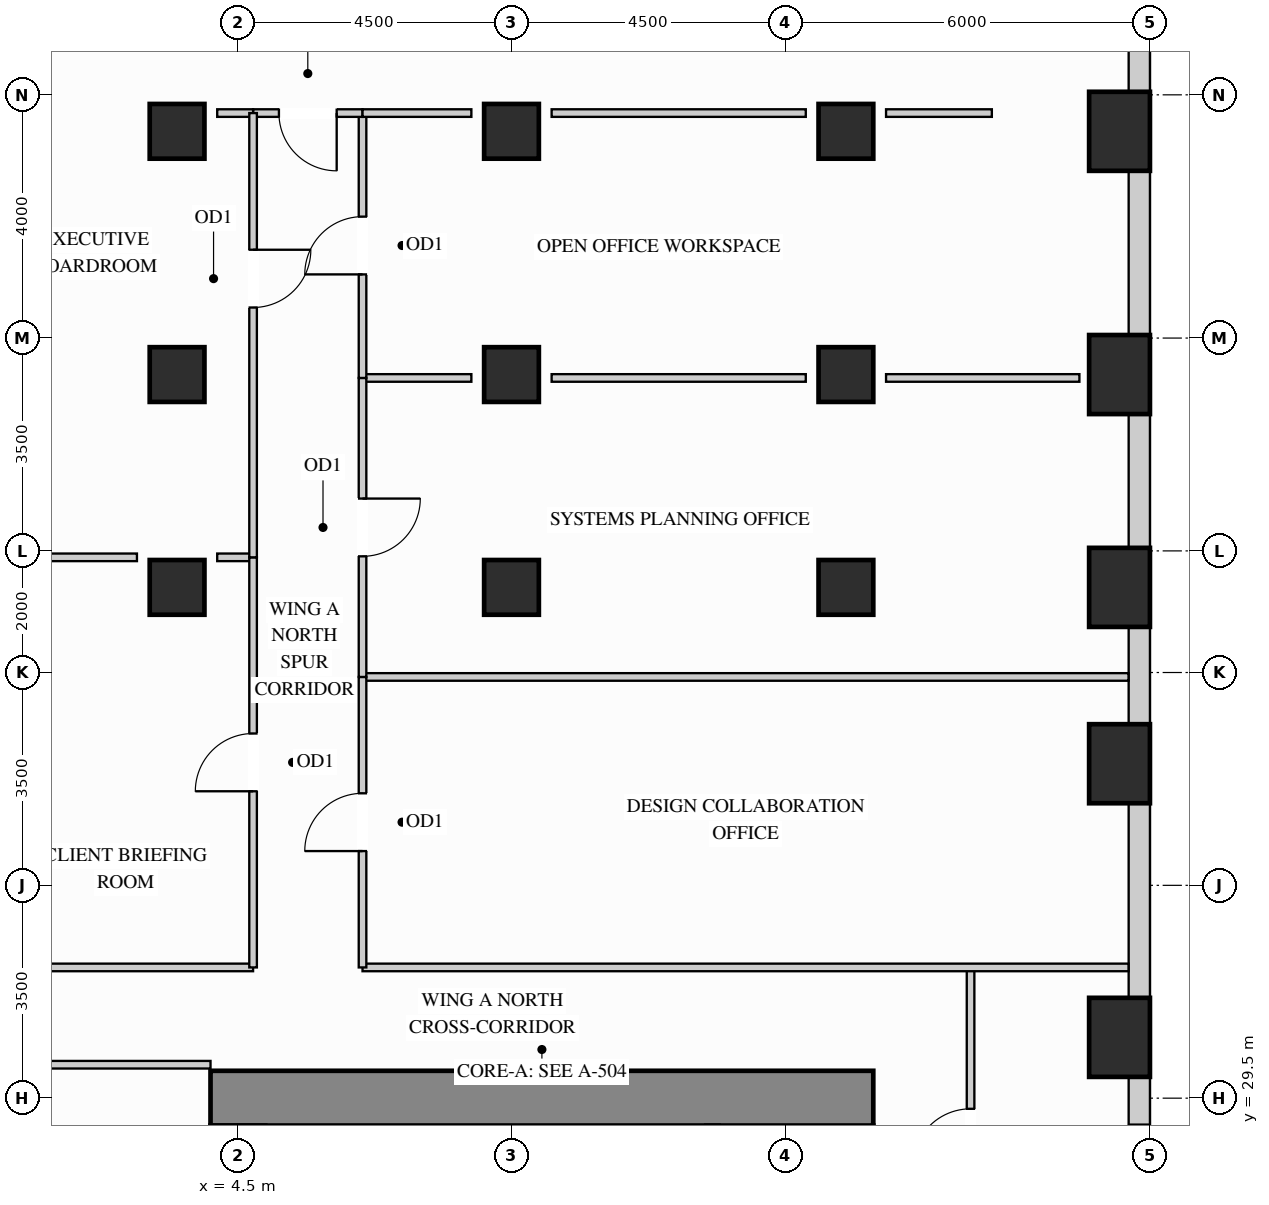
"""IFC4 building model, lengths in metres.
Left out: names, types, materials, properties, quantities, classifications, styles, units other than length and angle.
Written with IfcOpenShell. Run it as: python <this file> out.ifc"""

import sys

from ifc_helpers import new_model, si_unit, direction, frame, frame_2d, origin, origin_2d, place, context, subcontext, project, spatial, rectangle, extrude, source, transform, mapped, element, fill, save


model = new_model("IFC4")
c1 = context("Model", 3, precision=1e-05, world=origin(), true_north=direction((0.0, 1.0)))
c2 = subcontext(c1, "Body", "Model", "MODEL_VIEW")
j1 = project(units=[si_unit("LENGTHUNIT", "METRE"), si_unit("PLANEANGLEUNIT", "RADIAN")], contexts=[c1])
p1 = place(None, origin())
s1 = spatial("IfcSite", under=j1, at=p1, CompositionType="ELEMENT")
p2 = place(p1, origin())
s2 = spatial("IfcBuilding", under=s1, at=p2, CompositionType="ELEMENT")
p3 = place(p2, frame((0.0, 0.0, 44.1)))
s3 = spatial("IfcBuildingStorey", under=s2, at=p3, CompositionType="ELEMENT", Elevation=44.1)
m1 = source(origin(), c2, "Body", "SweptSolid", [
    extrude(rectangle(XDim=0.9, YDim=0.9, at=origin_2d()), origin(), (0.0, 0.0, 1.0), 3.38),
])
for number, where, z_axis, x_axis in (
    (1, (14.5, 37.9, 0.0), (0.0, 0.0, 1.0), (1.0, 0.0, 0.0)),
    (2, (14.5, 41.4, 0.0), (0.0, 0.0, 1.0), (1.0, 0.0, 0.0)),
    (3, (14.5, 45.4, 0.0), (0.0, 0.0, 1.0), (1.0, 0.0, 0.0)),
    (4, (3.5, 37.9, 0.0), (0.0, 0.0, 1.0), (1.0, 0.0, 0.0)),
    (5, (3.5, 41.4, 0.0), (0.0, 0.0, 1.0), (1.0, 0.0, 0.0)),
    (6, (3.5, 45.4, 0.0), (0.0, 0.0, 1.0), (1.0, 0.0, 0.0)),
    (7, (9.0, 37.9, 0.0), (0.0, 0.0, 1.0), (1.0, 0.0, 0.0)),
    (8, (9.0, 41.4, 0.0), (0.0, 0.0, 1.0), (1.0, 0.0, 0.0)),
    (9, (9.0, 45.4, 0.0), (0.0, 0.0, 1.0), (1.0, 0.0, 0.0)),
):
    element("IfcColumn", number, at=place(p3, frame(where, z_axis=z_axis, x_axis=x_axis)), inside=s3, PredefinedType="COLUMN", context=c2, shape_type="MappedRepresentation", body=[
        mapped(m1, transform((0.0, 0.0, 0.0), x_axis=(1.0, 0.0, 0.0), y_axis=(0.0, 1.0, 0.0), z_axis=(0.0, 0.0, 1.0))),
    ])
m2 = source(origin(), c2, "Body", "SweptSolid", [
    extrude(rectangle(XDim=1.0, YDim=1.3, at=origin_2d()), origin(), (0.0, 0.0, 1.0), 3.38),
])
for number, where, z_axis, x_axis in (
    (10, (19.0, 30.5, 0.0), (0.0, 0.0, 1.0), (1.0, 0.0, 0.0)),
    (11, (19.0, 35.0, 0.0), (0.0, 0.0, 1.0), (1.0, 0.0, 0.0)),
    (12, (19.0, 37.9, 0.0), (0.0, 0.0, 1.0), (1.0, 0.0, 0.0)),
    (13, (19.0, 41.4, 0.0), (0.0, 0.0, 1.0), (1.0, 0.0, 0.0)),
    (14, (19.0, 45.4, 0.0), (0.0, 0.0, 1.0), (1.0, 0.0, 0.0)),
):
    element("IfcColumn", number, at=place(p3, frame(where, z_axis=z_axis, x_axis=x_axis)), inside=s3, PredefinedType="COLUMN", context=c2, shape_type="MappedRepresentation", body=[
        mapped(m2, transform((0.0, 0.0, 0.0), x_axis=(1.0, 0.0, 0.0), y_axis=(0.0, 1.0, 0.0), z_axis=(0.0, 0.0, 1.0))),
    ])
m3 = source(origin(), c2, "Body", "SweptSolid", [
    extrude(rectangle(XDim=10.9, YDim=0.9, at=frame_2d((5.45, 0.0))), origin(), (0.0, 0.0, 1.0), 3.38),
])
p4 = place(p3, frame((4.05, 29.5, 0.0), z_axis=(0.0, 0.0, 1.0), x_axis=(1.0, 0.0, 0.0)))
e15 = element("IfcWall", 15, at=p4, inside=s3, PredefinedType="SHEAR", context=c2, shape_type="MappedRepresentation", body=[
    mapped(m3, transform((0.0, 0.0, 0.0), x_axis=(1.0, 0.0, 0.0), y_axis=(0.0, 1.0, 0.0), z_axis=(0.0, 0.0, 1.0))),
])
p5 = place(p3, frame((19.325, 27.448, 0.0), z_axis=(0.0, 0.0, 1.0), x_axis=(0.0, 1.0, 0.0)))
e16 = element("IfcWall", 16, at=p5, inside=s3, PredefinedType="SOLIDWALL", context=c2, shape_type="SweptSolid", body=[
    extrude(rectangle(XDim=2.404, YDim=0.35, at=frame_2d((1.202, 0.0))), origin(), (0.0, 0.0, 1.0), 2.51),
])
p6 = place(p5, frame((0.417, 0.0, 0.78)))
e17 = element("IfcOpeningElement", 17, at=p6, cuts=e16, PredefinedType="OPENING", context=c2, shape_type="SweptSolid", body=[
    extrude(rectangle(XDim=1.2, YDim=1.55, at=frame_2d((0.6, 0.775))), frame((0.0, 0.185, 0.0), z_axis=(0.0, -1.0, 0.0), x_axis=(1.0, 0.0, 0.0)), (0.0, 0.0, 1.0), 0.37),
])
m4 = source(origin(), c2, "Body", "SweptSolid", [
    extrude(rectangle(XDim=3.204, YDim=0.35, at=frame_2d((1.602, 0.0))), origin(), (0.0, 0.0, 1.0), 2.51),
])
p7 = place(p3, frame((19.325, 31.148, 0.0), z_axis=(0.0, 0.0, 1.0), x_axis=(0.0, 1.0, 0.0)))
e18 = element("IfcWall", 18, at=p7, inside=s3, PredefinedType="SOLIDWALL", context=c2, shape_type="MappedRepresentation", body=[
    mapped(m4, transform((0.0, 0.0, 0.0), x_axis=(1.0, 0.0, 0.0), y_axis=(0.0, 1.0, 0.0), z_axis=(0.0, 0.0, 1.0))),
])
m5 = source(origin(), c2, "Body", "SweptSolid", [
    extrude(rectangle(XDim=1.604, YDim=0.35, at=frame_2d((0.802, 0.0))), origin(), (0.0, 0.0, 1.0), 2.51),
])
p8 = place(p3, frame((19.325, 35.648, 0.0), z_axis=(0.0, 0.0, 1.0), x_axis=(0.0, 1.0, 0.0)))
e19 = element("IfcWall", 19, at=p8, inside=s3, PredefinedType="SOLIDWALL", context=c2, shape_type="MappedRepresentation", body=[
    mapped(m5, transform((0.0, 0.0, 0.0), x_axis=(1.0, 0.0, 0.0), y_axis=(0.0, 1.0, 0.0), z_axis=(0.0, 0.0, 1.0))),
])
m6 = source(origin(), c2, "Body", "SweptSolid", [
    extrude(rectangle(XDim=2.204, YDim=0.35, at=frame_2d((1.102, 0.0))), origin(), (0.0, 0.0, 1.0), 2.51),
])
p9 = place(p3, frame((19.325, 38.548, 0.0), z_axis=(0.0, 0.0, 1.0), x_axis=(0.0, 1.0, 0.0)))
e20 = element("IfcWall", 20, at=p9, inside=s3, PredefinedType="SOLIDWALL", context=c2, shape_type="MappedRepresentation", body=[
    mapped(m6, transform((0.0, 0.0, 0.0), x_axis=(1.0, 0.0, 0.0), y_axis=(0.0, 1.0, 0.0), z_axis=(0.0, 0.0, 1.0))),
])
m7 = source(origin(), c2, "Body", "SweptSolid", [
    extrude(rectangle(XDim=2.704, YDim=0.35, at=frame_2d((1.352, 0.0))), origin(), (0.0, 0.0, 1.0), 2.51),
])
p10 = place(p3, frame((19.325, 42.048, 0.0), z_axis=(0.0, 0.0, 1.0), x_axis=(0.0, 1.0, 0.0)))
e21 = element("IfcWall", 21, at=p10, inside=s3, PredefinedType="SOLIDWALL", context=c2, shape_type="MappedRepresentation", body=[
    mapped(m7, transform((0.0, 0.0, 0.0), x_axis=(1.0, 0.0, 0.0), y_axis=(0.0, 1.0, 0.0), z_axis=(0.0, 0.0, 1.0))),
])
m8 = source(origin(), c2, "Body", "SweptSolid", [
    extrude(rectangle(XDim=1.104, YDim=0.35, at=frame_2d((0.552, 0.0))), origin(), (0.0, 0.0, 1.0), 3.365),
])
p11 = place(p3, frame((19.325, 46.048, 0.0), z_axis=(0.0, 0.0, 1.0), x_axis=(0.0, 1.0, 0.0)))
e22 = element("IfcWall", 22, at=p11, inside=s3, PredefinedType="SOLIDWALL", context=c2, shape_type="MappedRepresentation", body=[
    mapped(m8, transform((0.0, 0.0, 0.0), x_axis=(1.0, 0.0, 0.0), y_axis=(0.0, 1.0, 0.0), z_axis=(0.0, 0.0, 1.0))),
])
p12 = place(p3, frame((16.55, 26.05, 0.0), z_axis=(0.0, 0.0, 1.0), x_axis=(0.0, 1.0, 0.0)))
e23 = element("IfcWall", 23, at=p12, inside=s3, PredefinedType="PARTITIONING", context=c2, shape_type="SweptSolid", body=[
    extrude(rectangle(XDim=5.6, YDim=0.125, at=frame_2d((2.8, 0.0))), origin(), (0.0, 0.0, 1.0), 3.365),
])
p13 = place(p12, frame((2.325, 0.0, 0.0)))
e24 = element("IfcOpeningElement", 24, at=p13, cuts=e23, PredefinedType="OPENING", context=c2, shape_type="SweptSolid", body=[
    extrude(rectangle(XDim=0.95, YDim=2.15, at=frame_2d((0.475, 1.075))), frame((0.0, 0.073, 0.0), z_axis=(0.0, -1.0, 0.0), x_axis=(1.0, 0.0, 0.0)), (0.0, 0.0, 1.0), 0.145),
])
m9 = source(origin(), c2, "Body", "SweptSolid", [
    extrude(rectangle(XDim=12.598, YDim=0.125, at=frame_2d((6.299, 0.0))), origin(), (0.0, 0.0, 1.0), 2.828),
])
p14 = place(p3, frame((6.55, 36.427, 0.0), z_axis=(0.0, 0.0, 1.0), x_axis=(1.0, 0.0, 0.0)))
e25 = element("IfcWall", 25, at=p14, inside=s3, PredefinedType="PARTITIONING", context=c2, shape_type="MappedRepresentation", body=[
    mapped(m9, transform((0.0, 0.0, 0.0), x_axis=(1.0, 0.0, 0.0), y_axis=(0.0, 1.0, 0.0), z_axis=(0.0, 0.0, 1.0))),
])
m10 = source(origin(), c2, "Body", "SweptSolid", [
    extrude(rectangle(XDim=1.79, YDim=0.125, at=frame_2d((0.895, 0.0))), origin(), (0.0, 0.0, 1.0), 2.67),
])
p15 = place(p3, frame((6.55, 41.344, 0.0), z_axis=(0.0, 0.0, 1.0), x_axis=(1.0, 0.0, 0.0)))
e26 = element("IfcWall", 26, at=p15, inside=s3, PredefinedType="PARTITIONING", context=c2, shape_type="MappedRepresentation", body=[
    mapped(m10, transform((0.0, 0.0, 0.0), x_axis=(1.0, 0.0, 0.0), y_axis=(0.0, 1.0, 0.0), z_axis=(0.0, 0.0, 1.0))),
])
m11 = source(origin(), c2, "Body", "SweptSolid", [
    extrude(rectangle(XDim=4.18, YDim=0.125, at=frame_2d((2.09, 0.0))), origin(), (0.0, 0.0, 1.0), 2.67),
])
p16 = place(p3, frame((9.66, 41.344, 0.0), z_axis=(0.0, 0.0, 1.0), x_axis=(1.0, 0.0, 0.0)))
e27 = element("IfcWall", 27, at=p16, inside=s3, PredefinedType="PARTITIONING", context=c2, shape_type="MappedRepresentation", body=[
    mapped(m11, transform((0.0, 0.0, 0.0), x_axis=(1.0, 0.0, 0.0), y_axis=(0.0, 1.0, 0.0), z_axis=(0.0, 0.0, 1.0))),
])
m12 = source(origin(), c2, "Body", "SweptSolid", [
    extrude(rectangle(XDim=3.18, YDim=0.125, at=frame_2d((1.59, 0.0))), origin(), (0.0, 0.0, 1.0), 2.67),
])
p17 = place(p3, frame((15.16, 41.344, 0.0), z_axis=(0.0, 0.0, 1.0), x_axis=(1.0, 0.0, 0.0)))
e28 = element("IfcWall", 28, at=p17, inside=s3, PredefinedType="PARTITIONING", context=c2, shape_type="MappedRepresentation", body=[
    mapped(m12, transform((0.0, 0.0, 0.0), x_axis=(1.0, 0.0, 0.0), y_axis=(0.0, 1.0, 0.0), z_axis=(0.0, 0.0, 1.0))),
])
p18 = place(p3, frame((6.55, 31.65, 0.0), z_axis=(0.0, 0.0, 1.0), x_axis=(1.0, 0.0, 0.0)))
e29 = element("IfcWall", 29, at=p18, inside=s3, PredefinedType="PARTITIONING", context=c2, shape_type="MappedRepresentation", body=[
    mapped(m9, transform((0.0, 0.0, 0.0), x_axis=(1.0, 0.0, 0.0), y_axis=(0.0, 1.0, 0.0), z_axis=(0.0, 0.0, 1.0))),
])
m13 = source(origin(), c2, "Body", "SweptSolid", [
    extrude(rectangle(XDim=4.398, YDim=0.125, at=frame_2d((2.199, 0.0))), origin(), (0.0, 0.0, 1.0), 2.828),
])
p19 = place(p3, frame((0.352, 31.65, 0.0), z_axis=(0.0, 0.0, 1.0), x_axis=(1.0, 0.0, 0.0)))
e30 = element("IfcWall", 30, at=p19, inside=s3, PredefinedType="PARTITIONING", context=c2, shape_type="MappedRepresentation", body=[
    mapped(m13, transform((0.0, 0.0, 0.0), x_axis=(1.0, 0.0, 0.0), y_axis=(0.0, 1.0, 0.0), z_axis=(0.0, 0.0, 1.0))),
])
m14 = source(origin(), c2, "Body", "SweptSolid", [
    extrude(rectangle(XDim=1.58, YDim=0.125, at=frame_2d((0.79, 0.0))), origin(), (0.0, 0.0, 1.0), 3.365),
])
p20 = place(p3, frame((1.26, 38.394, 0.0), z_axis=(0.0, 0.0, 1.0), x_axis=(1.0, 0.0, 0.0)))
e31 = element("IfcWall", 31, at=p20, inside=s3, PredefinedType="PARTITIONING", context=c2, shape_type="MappedRepresentation", body=[
    mapped(m14, transform((0.0, 0.0, 0.0), x_axis=(1.0, 0.0, 0.0), y_axis=(0.0, 1.0, 0.0), z_axis=(0.0, 0.0, 1.0))),
])
m15 = source(origin(), c2, "Body", "SweptSolid", [
    extrude(rectangle(XDim=0.59, YDim=0.125, at=frame_2d((0.295, 0.0))), origin(), (0.0, 0.0, 1.0), 3.365),
])
p21 = place(p3, frame((4.16, 38.394, 0.0), z_axis=(0.0, 0.0, 1.0), x_axis=(1.0, 0.0, 0.0)))
e32 = element("IfcWall", 32, at=p21, inside=s3, PredefinedType="PARTITIONING", context=c2, shape_type="MappedRepresentation", body=[
    mapped(m15, transform((0.0, 0.0, 0.0), x_axis=(1.0, 0.0, 0.0), y_axis=(0.0, 1.0, 0.0), z_axis=(0.0, 0.0, 1.0))),
])
m16 = source(origin(), c2, "Body", "SweptSolid", [
    extrude(rectangle(XDim=2.79, YDim=0.125, at=frame_2d((1.395, 0.0))), origin(), (0.0, 0.0, 1.0), 3.365),
])
p22 = place(p3, frame((1.26, 30.05, 0.0), z_axis=(0.0, 0.0, 1.0), x_axis=(1.0, 0.0, 0.0)))
e33 = element("IfcWall", 33, at=p22, inside=s3, PredefinedType="PARTITIONING", context=c2, shape_type="MappedRepresentation", body=[
    mapped(m16, transform((0.0, 0.0, 0.0), x_axis=(1.0, 0.0, 0.0), y_axis=(0.0, 1.0, 0.0), z_axis=(0.0, 0.0, 1.0))),
])
p23 = place(p3, frame((6.55, 31.65, 0.0), z_axis=(0.0, 0.0, 1.0), x_axis=(0.0, 1.0, 0.0)))
e34 = element("IfcWall", 34, at=p23, inside=s3, PredefinedType="PARTITIONING", context=c2, shape_type="SweptSolid", body=[
    extrude(rectangle(XDim=4.777, YDim=0.125, at=frame_2d((2.389, 0.0))), origin(), (0.0, 0.0, 1.0), 3.365),
])
p24 = place(p23, frame((1.914, 0.0, 0.0)))
e35 = element("IfcOpeningElement", 35, at=p24, cuts=e34, PredefinedType="OPENING", context=c2, shape_type="SweptSolid", body=[
    extrude(rectangle(XDim=0.95, YDim=2.15, at=frame_2d((0.475, 1.075))), frame((0.0, 0.073, 0.0), z_axis=(0.0, -1.0, 0.0), x_axis=(1.0, 0.0, 0.0)), (0.0, 0.0, 1.0), 0.145),
])
p25 = place(p3, frame((6.55, 36.427, 0.0), z_axis=(0.0, 0.0, 1.0), x_axis=(0.0, 1.0, 0.0)))
e36 = element("IfcWall", 36, at=p25, inside=s3, PredefinedType="PARTITIONING", context=c2, shape_type="SweptSolid", body=[
    extrude(rectangle(XDim=4.917, YDim=0.125, at=frame_2d((2.458, 0.0))), origin(), (0.0, 0.0, 1.0), 3.365),
])
p26 = place(p25, frame((1.983, 0.0, 0.0)))
e37 = element("IfcOpeningElement", 37, at=p26, cuts=e36, PredefinedType="OPENING", context=c2, shape_type="SweptSolid", body=[
    extrude(rectangle(XDim=0.95, YDim=2.15, at=frame_2d((0.475, 1.075))), frame((0.0, 0.073, 0.0), z_axis=(0.0, -1.0, 0.0), x_axis=(1.0, 0.0, 0.0)), (0.0, 0.0, 1.0), 0.145),
])
p27 = place(p3, frame((6.55, 41.344, 0.0), z_axis=(0.0, 0.0, 1.0), x_axis=(0.0, 1.0, 0.0)))
e38 = element("IfcWall", 38, at=p27, inside=s3, PredefinedType="PARTITIONING", context=c2, shape_type="SweptSolid", body=[
    extrude(rectangle(XDim=4.356, YDim=0.125, at=frame_2d((2.178, 0.0))), origin(), (0.0, 0.0, 1.0), 3.365),
])
p28 = place(p27, frame((1.703, 0.0, 0.0)))
e39 = element("IfcOpeningElement", 39, at=p28, cuts=e38, PredefinedType="OPENING", context=c2, shape_type="SweptSolid", body=[
    extrude(rectangle(XDim=0.95, YDim=2.15, at=frame_2d((0.475, 1.075))), frame((0.0, 0.073, 0.0), z_axis=(0.0, -1.0, 0.0), x_axis=(1.0, 0.0, 0.0)), (0.0, 0.0, 1.0), 0.145),
])
p29 = place(p3, frame((4.75, 45.7, 0.0), z_axis=(0.0, 0.0, 1.0), x_axis=(1.0, 0.0, 0.0)))
e40 = element("IfcWall", 40, at=p29, inside=s3, PredefinedType="PARTITIONING", context=c2, shape_type="SweptSolid", body=[
    extrude(rectangle(XDim=1.8, YDim=0.125, at=frame_2d((0.9, 0.0))), origin(), (0.0, 0.0, 1.0), 2.67),
])
p30 = place(p29, frame((0.425, 0.0, 0.0)))
e41 = element("IfcOpeningElement", 41, at=p30, cuts=e40, PredefinedType="OPENING", context=c2, shape_type="SweptSolid", body=[
    extrude(rectangle(XDim=0.95, YDim=2.15, at=frame_2d((0.475, 1.075))), frame((0.0, 0.073, 0.0), z_axis=(0.0, -1.0, 0.0), x_axis=(1.0, 0.0, 0.0)), (0.0, 0.0, 1.0), 0.145),
])
p31 = place(p3, frame((6.55, 45.7, 0.0), z_axis=(0.0, 0.0, 1.0), x_axis=(1.0, 0.0, 0.0)))
e42 = element("IfcWall", 42, at=p31, inside=s3, PredefinedType="PARTITIONING", context=c2, shape_type="MappedRepresentation", body=[
    mapped(m10, transform((0.0, 0.0, 0.0), x_axis=(1.0, 0.0, 0.0), y_axis=(0.0, 1.0, 0.0), z_axis=(0.0, 0.0, 1.0))),
])
p32 = place(p3, frame((9.66, 45.7, 0.0), z_axis=(0.0, 0.0, 1.0), x_axis=(1.0, 0.0, 0.0)))
e43 = element("IfcWall", 43, at=p32, inside=s3, PredefinedType="PARTITIONING", context=c2, shape_type="MappedRepresentation", body=[
    mapped(m11, transform((0.0, 0.0, 0.0), x_axis=(1.0, 0.0, 0.0), y_axis=(0.0, 1.0, 0.0), z_axis=(0.0, 0.0, 1.0))),
])
m17 = source(origin(), c2, "Body", "SweptSolid", [
    extrude(rectangle(XDim=1.74, YDim=0.125, at=frame_2d((0.87, 0.0))), origin(), (0.0, 0.0, 1.0), 2.67),
])
p33 = place(p3, frame((15.16, 45.7, 0.0), z_axis=(0.0, 0.0, 1.0), x_axis=(1.0, 0.0, 0.0)))
e44 = element("IfcWall", 44, at=p33, inside=s3, PredefinedType="PARTITIONING", context=c2, shape_type="MappedRepresentation", body=[
    mapped(m17, transform((0.0, 0.0, 0.0), x_axis=(1.0, 0.0, 0.0), y_axis=(0.0, 1.0, 0.0), z_axis=(0.0, 0.0, 1.0))),
])
m18 = source(origin(), c2, "Body", "SweptSolid", [
    extrude(rectangle(XDim=0.59, YDim=0.125, at=frame_2d((0.295, 0.0))), origin(), (0.0, 0.0, 1.0), 2.67),
])
p34 = place(p3, frame((4.16, 45.7, 0.0), z_axis=(0.0, 0.0, 1.0), x_axis=(1.0, 0.0, 0.0)))
e45 = element("IfcWall", 45, at=p34, inside=s3, PredefinedType="PARTITIONING", context=c2, shape_type="MappedRepresentation", body=[
    mapped(m18, transform((0.0, 0.0, 0.0), x_axis=(1.0, 0.0, 0.0), y_axis=(0.0, 1.0, 0.0), z_axis=(0.0, 0.0, 1.0))),
])
p35 = place(p3, frame((4.75, 31.65, 0.0), z_axis=(0.0, 0.0, 1.0), x_axis=(0.0, 1.0, 0.0)))
e46 = element("IfcWall", 46, at=p35, inside=s3, PredefinedType="PARTITIONING", context=c2, shape_type="SweptSolid", body=[
    extrude(rectangle(XDim=6.744, YDim=0.125, at=frame_2d((3.372, 0.0))), origin(), (0.0, 0.0, 1.0), 3.365),
])
p36 = place(p35, frame((2.897, 0.0, 0.0)))
e47 = element("IfcOpeningElement", 47, at=p36, cuts=e46, PredefinedType="OPENING", context=c2, shape_type="SweptSolid", body=[
    extrude(rectangle(XDim=0.95, YDim=2.15, at=frame_2d((0.475, 1.075))), frame((0.0, 0.073, 0.0), z_axis=(0.0, -1.0, 0.0), x_axis=(1.0, 0.0, 0.0)), (0.0, 0.0, 1.0), 0.145),
])
p37 = place(p3, frame((4.75, 38.394, 0.0), z_axis=(0.0, 0.0, 1.0), x_axis=(0.0, 1.0, 0.0)))
e48 = element("IfcWall", 48, at=p37, inside=s3, PredefinedType="PARTITIONING", context=c2, shape_type="SweptSolid", body=[
    extrude(rectangle(XDim=7.306, YDim=0.125, at=frame_2d((3.653, 0.0))), origin(), (0.0, 0.0, 1.0), 3.365),
])
p38 = place(p37, frame((4.108, 0.0, 0.0)))
e49 = element("IfcOpeningElement", 49, at=p38, cuts=e48, PredefinedType="OPENING", context=c2, shape_type="SweptSolid", body=[
    extrude(rectangle(XDim=0.95, YDim=2.15, at=frame_2d((0.475, 1.075))), frame((0.0, 0.073, 0.0), z_axis=(0.0, -1.0, 0.0), x_axis=(1.0, 0.0, 0.0)), (0.0, 0.0, 1.0), 0.145),
])
m19 = source(origin(), c2, "Body", "SweptSolid", [
    extrude(rectangle(XDim=0.95, YDim=2.15, at=frame_2d((0.475, 1.075))), frame((0.0, 0.025, 0.0), z_axis=(0.0, -1.0, 0.0), x_axis=(1.0, 0.0, 0.0)), (0.0, 0.0, 1.0), 0.05),
])
p39 = place(p13, origin())
e50 = element("IfcDoor", 50, at=p39, inside=s3, OperationType="SINGLE_SWING_LEFT", PredefinedType="DOOR", context=c2, shape_type="MappedRepresentation", body=[
    mapped(m19, transform((0.0, 0.0, 0.0), x_axis=(1.0, 0.0, 0.0), y_axis=(0.0, 1.0, 0.0), z_axis=(0.0, 0.0, 1.0))),
])
fill(e24, e50)
p40 = place(p24, origin())
e51 = element("IfcDoor", 51, at=p40, inside=s3, OperationType="SINGLE_SWING_LEFT", PredefinedType="DOOR", context=c2, shape_type="MappedRepresentation", body=[
    mapped(m19, transform((0.0, 0.0, 0.0), x_axis=(1.0, 0.0, 0.0), y_axis=(0.0, 1.0, 0.0), z_axis=(0.0, 0.0, 1.0))),
])
fill(e35, e51)
p41 = place(p26, origin())
e52 = element("IfcDoor", 52, at=p41, inside=s3, OperationType="SINGLE_SWING_RIGHT", PredefinedType="DOOR", context=c2, shape_type="MappedRepresentation", body=[
    mapped(m19, transform((0.0, 0.0, 0.0), x_axis=(1.0, 0.0, 0.0), y_axis=(0.0, 1.0, 0.0), z_axis=(0.0, 0.0, 1.0))),
])
fill(e37, e52)
p42 = place(p28, origin())
e53 = element("IfcDoor", 53, at=p42, inside=s3, OperationType="SINGLE_SWING_LEFT", PredefinedType="DOOR", context=c2, shape_type="MappedRepresentation", body=[
    mapped(m19, transform((0.0, 0.0, 0.0), x_axis=(1.0, 0.0, 0.0), y_axis=(0.0, 1.0, 0.0), z_axis=(0.0, 0.0, 1.0))),
])
fill(e39, e53)
p43 = place(p30, origin())
e54 = element("IfcDoor", 54, at=p43, inside=s3, OperationType="SINGLE_SWING_RIGHT", PredefinedType="DOOR", context=c2, shape_type="MappedRepresentation", body=[
    mapped(m19, transform((0.0, 0.0, 0.0), x_axis=(1.0, 0.0, 0.0), y_axis=(0.0, 1.0, 0.0), z_axis=(0.0, 0.0, 1.0))),
])
fill(e41, e54)
p44 = place(p36, origin())
e55 = element("IfcDoor", 55, at=p44, inside=s3, OperationType="SINGLE_SWING_LEFT", PredefinedType="DOOR", context=c2, shape_type="MappedRepresentation", body=[
    mapped(m19, transform((0.0, 0.0, 0.0), x_axis=(1.0, 0.0, 0.0), y_axis=(0.0, 1.0, 0.0), z_axis=(0.0, 0.0, 1.0))),
])
fill(e47, e55)
p45 = place(p38, origin())
e56 = element("IfcDoor", 56, at=p45, inside=s3, OperationType="SINGLE_SWING_RIGHT", PredefinedType="DOOR", context=c2, shape_type="MappedRepresentation", body=[
    mapped(m19, transform((0.0, 0.0, 0.0), x_axis=(1.0, 0.0, 0.0), y_axis=(0.0, 1.0, 0.0), z_axis=(0.0, 0.0, 1.0))),
])
fill(e49, e56)
m20 = source(origin(), c2, "Body", "SweptSolid", [
    extrude(rectangle(XDim=1.2, YDim=1.55, at=frame_2d((0.6, 0.775))), frame((0.0, 0.03, 0.0), z_axis=(0.0, -1.0, 0.0), x_axis=(1.0, 0.0, 0.0)), (0.0, 0.0, 1.0), 0.06),
])
p46 = place(p6, origin())
e57 = element("IfcWindow", 57, at=p46, inside=s3, PartitioningType="SINGLE_PANEL", PredefinedType="WINDOW", context=c2, shape_type="MappedRepresentation", body=[
    mapped(m20, transform((0.0, 0.0, 0.0), x_axis=(1.0, 0.0, 0.0), y_axis=(0.0, 1.0, 0.0), z_axis=(0.0, 0.0, 1.0))),
])
fill(e17, e57)
save(model, sys.argv[1])
